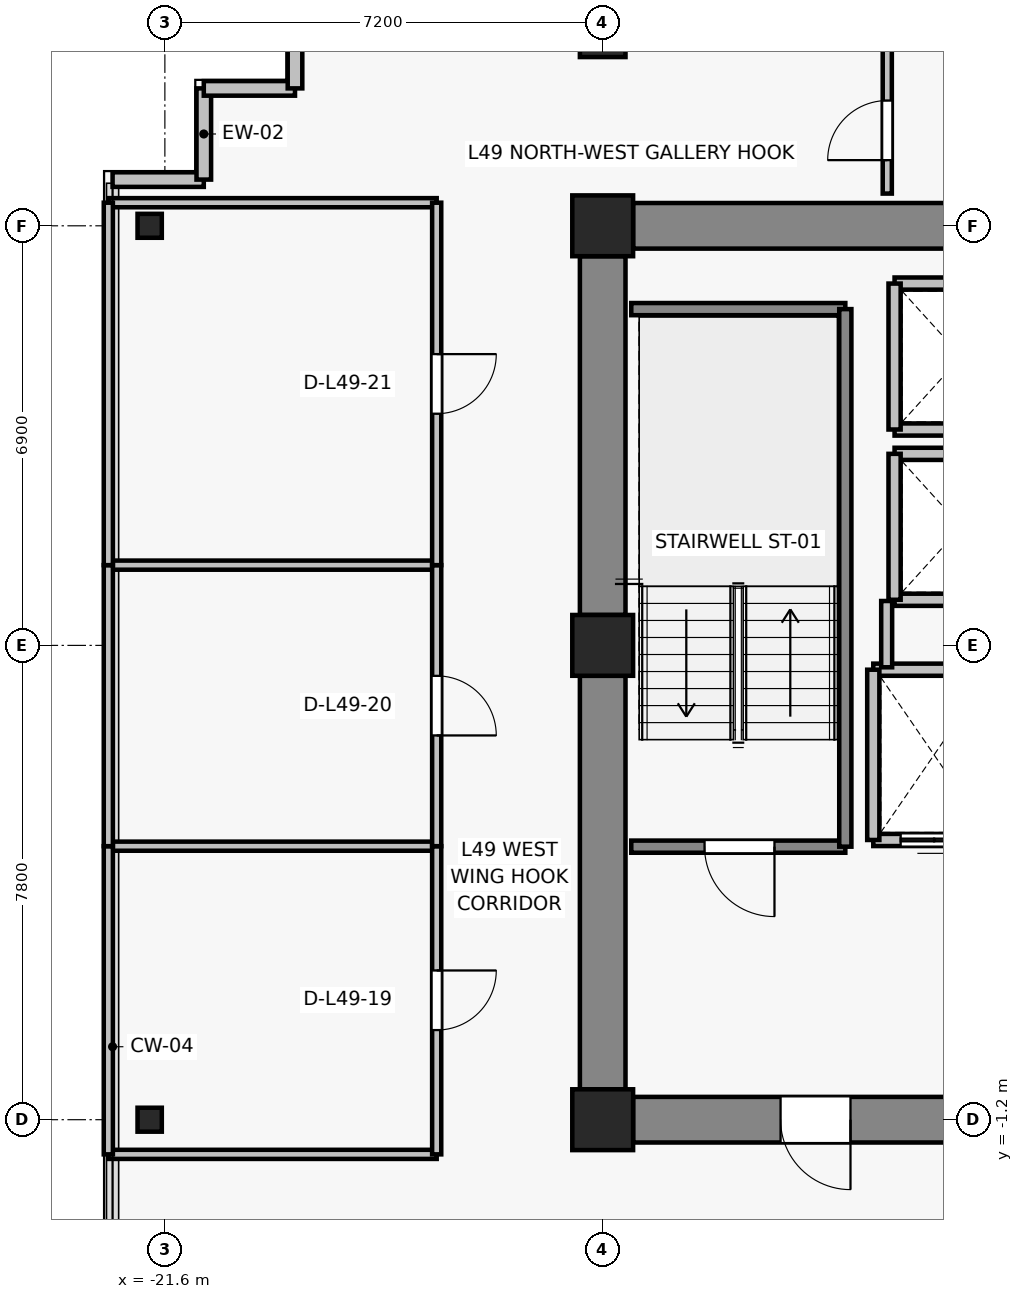
"""IFC4 building model, lengths in metres.
Left out: names, types, materials, properties, quantities, classifications, styles, units other than length and angle.
Written with IfcOpenShell. Run it as: python <this file> out.ifc"""

import sys

from ifc_helpers import new_model, si_unit, direction, frame, frame_2d, origin, origin_2d, place, context, subcontext, project, spatial, rectangle, i_section, extrude, source, transform, mapped, element, fill, save


model = new_model("IFC4")
c1 = context("Model", 3, precision=1e-05, world=origin(), true_north=direction((0.0, 1.0)))
c2 = subcontext(c1, "Body", "Model", "MODEL_VIEW")
j1 = project(units=[si_unit("LENGTHUNIT", "METRE"), si_unit("PLANEANGLEUNIT", "RADIAN")], contexts=[c1])
p1 = place(None, origin())
s1 = spatial("IfcSite", under=j1, at=p1, CompositionType="ELEMENT")
p2 = place(p1, origin())
s2 = spatial("IfcBuilding", under=s1, at=p2, CompositionType="ELEMENT")
p3 = place(p2, frame((0.0, 0.0, 175.9)))
s3 = spatial("IfcBuildingStorey", under=s2, at=p3, CompositionType="ELEMENT", Elevation=175.9)
for number, where, z_axis, x_axis in (
    (1, (-14.4, -1.2, 0.0), (0.0, 0.0, 1.0), (1.0, 0.0, 0.0)),
    (2, (-14.4, 6.6, 0.0), (0.0, 0.0, 1.0), (1.0, 0.0, 0.0)),
    (3, (-14.4, 13.5, 0.0), (0.0, 0.0, 1.0), (1.0, 0.0, 0.0)),
):
    element("IfcColumn", number, at=place(p3, frame(where, z_axis=z_axis, x_axis=x_axis)), inside=s3, PredefinedType="COLUMN", context=c2, shape_type="SweptSolid", body=[
        extrude(rectangle(XDim=1.0, YDim=1.0, at=origin_2d()), origin(), (0.0, 0.0, 1.0), 3.3),
    ])
p4 = place(p3, frame((-14.4, 16.65, 0.0), z_axis=(0.0, 0.0, 1.0), x_axis=(1.0, 0.0, 0.0)))
e4 = element("IfcColumn", 4, at=p4, inside=s3, PredefinedType="COLUMN", context=c2, shape_type="SweptSolid", body=[
    extrude(rectangle(XDim=0.75, YDim=0.75, at=origin_2d()), origin(), (0.0, 0.0, 1.0), 3.3),
])
for number, where, z_axis, x_axis in (
    (5, (-21.85, -1.2, 0.0), (0.0, 0.0, 1.0), (1.0, 0.0, 0.0)),
    (6, (-21.85, 13.5, 0.0), (0.0, 0.0, 1.0), (1.0, 0.0, 0.0)),
):
    element("IfcColumn", number, at=place(p3, frame(where, z_axis=z_axis, x_axis=x_axis)), inside=s3, PredefinedType="COLUMN", context=c2, shape_type="SweptSolid", body=[
        extrude(i_section(OverallWidth=0.399, OverallDepth=0.394, WebThickness=0.023, FlangeThickness=0.037, FilletRadius=0.015, at=origin_2d()), origin(), (0.0, 0.0, 1.0), 3.3),
    ])
p5 = place(p3, frame((-13.9, 13.5, 0.0), z_axis=(0.0, 0.0, 1.0), x_axis=(1.0, 0.0, 0.0)))
e7 = element("IfcWall", 7, at=p5, inside=s3, PredefinedType="SHEAR", context=c2, shape_type="SweptSolid", body=[
    extrude(rectangle(XDim=6.2, YDim=0.75, at=frame_2d((3.1, 0.0))), origin(), (0.0, 0.0, 1.0), 3.075),
])
p6 = place(p3, frame((-14.4, -0.7, 0.0), z_axis=(0.0, 0.0, 1.0), x_axis=(0.0, 1.0, 0.0)))
e8 = element("IfcWall", 8, at=p6, inside=s3, PredefinedType="SHEAR", context=c2, shape_type="SweptSolid", body=[
    extrude(rectangle(XDim=6.8, YDim=0.75, at=frame_2d((3.4, 0.0))), origin(), (0.0, 0.0, 1.0), 3.075),
])
p7 = place(p3, frame((-14.4, 7.1, 0.0), z_axis=(0.0, 0.0, 1.0), x_axis=(0.0, 1.0, 0.0)))
e9 = element("IfcWall", 9, at=p7, inside=s3, PredefinedType="SHEAR", context=c2, shape_type="SweptSolid", body=[
    extrude(rectangle(XDim=5.9, YDim=0.75, at=frame_2d((2.95, 0.0))), origin(), (0.0, 0.0, 1.0), 3.075),
])
p8 = place(p3, frame((-7.7, -1.2, 0.0), z_axis=(0.0, 0.0, 1.0), x_axis=(-1.0, 0.0, 0.0)))
e10 = element("IfcWall", 10, at=p8, inside=s3, PredefinedType="SHEAR", context=c2, shape_type="SweptSolid", body=[
    extrude(rectangle(XDim=6.2, YDim=0.75, at=frame_2d((3.1, 0.0))), origin(), (0.0, 0.0, 1.0), 3.075),
])
p9 = place(p8, frame((2.625, 0.0, 0.0)))
e11 = element("IfcOpeningElement", 11, at=p9, cuts=e10, PredefinedType="OPENING", context=c2, shape_type="SweptSolid", body=[
    extrude(rectangle(XDim=1.15, YDim=2.15, at=frame_2d((0.575, 1.075))), frame((0.0, 0.385, 0.0), z_axis=(0.0, -1.0, 0.0), x_axis=(1.0, 0.0, 0.0)), (0.0, 0.0, 1.0), 0.77),
])
for number, where, z_axis, x_axis in (
    (12, (-20.96, 14.26, 0.0), (0.0, 0.0, 1.0), (-1.0, 0.0, 0.0)),
    (13, (-20.96, 15.76, 0.0), (0.0, 0.0, 1.0), (0.0, -1.0, 0.0)),
    (14, (-19.46, 15.76, 0.0), (0.0, 0.0, 1.0), (-1.0, 0.0, 0.0)),
    (15, (-19.46, 17.26, 0.0), (0.0, 0.0, 1.0), (0.0, -1.0, 0.0)),
):
    element("IfcWall", number, at=place(p3, frame(where, z_axis=z_axis, x_axis=x_axis)), inside=s3, PredefinedType="SOLIDWALL", context=c2, shape_type="SweptSolid", body=[
        extrude(rectangle(XDim=1.5, YDim=0.24, at=frame_2d((0.75, 0.0))), origin(), (0.0, 0.0, 1.0), 3.075),
    ])
p10 = place(p3, frame((-7.95, 3.4, 0.0), z_axis=(0.0, 0.0, 1.0), x_axis=(-1.0, 0.0, 0.0)))
e16 = element("IfcWall", 16, at=p10, inside=s3, PredefinedType="SOLIDWALL", context=c2, shape_type="SweptSolid", body=[
    extrude(rectangle(XDim=2.0, YDim=0.2, at=frame_2d((1.0, 0.0))), origin(), (0.0, 0.0, 1.0), 3.075),
])
p11 = place(p10, frame((0.45, 0.0, 0.0)))
e17 = element("IfcOpeningElement", 17, at=p11, cuts=e16, PredefinedType="OPENING", context=c2, shape_type="SweptSolid", body=[
    extrude(rectangle(XDim=1.1, YDim=2.2, at=frame_2d((0.55, 1.1))), frame((0.0, 0.11, 0.0), z_axis=(0.0, -1.0, 0.0), x_axis=(1.0, 0.0, 0.0)), (0.0, 0.0, 1.0), 0.22),
])
p12 = place(p3, frame((-9.95, 6.2, 0.0), z_axis=(0.0, 0.0, 1.0), x_axis=(1.0, 0.0, 0.0)))
e18 = element("IfcWall", 18, at=p12, inside=s3, PredefinedType="SOLIDWALL", context=c2, shape_type="SweptSolid", body=[
    extrude(rectangle(XDim=2.0, YDim=0.2, at=frame_2d((1.0, 0.0))), origin(), (0.0, 0.0, 1.0), 3.075),
])
p13 = place(p3, frame((-9.95, 3.4, 0.0), z_axis=(0.0, 0.0, 1.0), x_axis=(0.0, 1.0, 0.0)))
e19 = element("IfcWall", 19, at=p13, inside=s3, PredefinedType="SOLIDWALL", context=c2, shape_type="SweptSolid", body=[
    extrude(rectangle(XDim=2.8, YDim=0.2, at=frame_2d((1.4, 0.0))), origin(), (0.0, 0.0, 1.0), 3.075),
])
for number, where, z_axis, x_axis in (
    (20, (-7.4, 7.35, 0.0), (0.0, 0.0, 1.0), (-1.0, 0.0, 0.0)),
    (21, (-9.6, 9.75, 0.0), (0.0, 0.0, 1.0), (1.0, 0.0, 0.0)),
):
    element("IfcWall", number, at=place(p3, frame(where, z_axis=z_axis, x_axis=x_axis)), inside=s3, PredefinedType="SOLIDWALL", context=c2, shape_type="SweptSolid", body=[
        extrude(rectangle(XDim=2.2, YDim=0.2, at=frame_2d((1.1, 0.0))), origin(), (0.0, 0.0, 1.0), 2.565),
    ])
p14 = place(p3, frame((-9.6, 7.35, 0.0), z_axis=(0.0, 0.0, 1.0), x_axis=(0.0, 1.0, 0.0)))
e22 = element("IfcWall", 22, at=p14, inside=s3, PredefinedType="SOLIDWALL", context=c2, shape_type="SweptSolid", body=[
    extrude(rectangle(XDim=2.4, YDim=0.2, at=frame_2d((1.2, 0.0))), origin(), (0.0, 0.0, 1.0), 3.075),
])
for number, where, z_axis, x_axis in (
    (23, (-7.4, 10.15, 0.0), (0.0, 0.0, 1.0), (-1.0, 0.0, 0.0)),
    (24, (-9.6, 12.55, 0.0), (0.0, 0.0, 1.0), (1.0, 0.0, 0.0)),
):
    element("IfcWall", number, at=place(p3, frame(where, z_axis=z_axis, x_axis=x_axis)), inside=s3, PredefinedType="SOLIDWALL", context=c2, shape_type="SweptSolid", body=[
        extrude(rectangle(XDim=2.2, YDim=0.2, at=frame_2d((1.1, 0.0))), origin(), (0.0, 0.0, 1.0), 2.565),
    ])
p15 = place(p3, frame((-9.6, 10.15, 0.0), z_axis=(0.0, 0.0, 1.0), x_axis=(0.0, 1.0, 0.0)))
e25 = element("IfcWall", 25, at=p15, inside=s3, PredefinedType="SOLIDWALL", context=c2, shape_type="SweptSolid", body=[
    extrude(rectangle(XDim=2.4, YDim=0.2, at=frame_2d((1.2, 0.0))), origin(), (0.0, 0.0, 1.0), 3.075),
])
p16 = place(p3, frame((-10.41, 3.29, 0.0), z_axis=(0.0, 0.0, 1.0), x_axis=(-1.0, 0.0, 0.0)))
e26 = element("IfcWall", 26, at=p16, inside=s3, PredefinedType="SOLIDWALL", context=c2, shape_type="SweptSolid", body=[
    extrude(rectangle(XDim=3.52, YDim=0.2, at=frame_2d((1.76, 0.0))), origin(), (0.0, 0.0, 1.0), 3.075),
])
p17 = place(p16, frame((1.165, 0.0, 0.0)))
e27 = element("IfcOpeningElement", 27, at=p17, cuts=e26, PredefinedType="OPENING", context=c2, shape_type="SweptSolid", body=[
    extrude(rectangle(XDim=1.15, YDim=2.15, at=frame_2d((0.575, 1.075))), frame((0.0, 0.11, 0.0), z_axis=(0.0, -1.0, 0.0), x_axis=(1.0, 0.0, 0.0)), (0.0, 0.0, 1.0), 0.22),
])
p18 = place(p3, frame((-13.93, 12.13, 0.0), z_axis=(0.0, 0.0, 1.0), x_axis=(1.0, 0.0, 0.0)))
e28 = element("IfcWall", 28, at=p18, inside=s3, PredefinedType="SOLIDWALL", context=c2, shape_type="SweptSolid", body=[
    extrude(rectangle(XDim=3.52, YDim=0.2, at=frame_2d((1.76, 0.0))), origin(), (0.0, 0.0, 1.0), 3.075),
])
p19 = place(p3, frame((-10.41, 12.13, 0.0), z_axis=(0.0, 0.0, 1.0), x_axis=(0.0, -1.0, 0.0)))
e29 = element("IfcWall", 29, at=p19, inside=s3, PredefinedType="SOLIDWALL", context=c2, shape_type="SweptSolid", body=[
    extrude(rectangle(XDim=8.84, YDim=0.2, at=frame_2d((4.42, 0.0))), origin(), (0.0, 0.0, 1.0), 3.075),
])
p20 = place(p3, frame((-9.73, 6.24, 0.0), z_axis=(0.0, 0.0, 1.0), x_axis=(0.0, 1.0, 0.0)))
e30 = element("IfcWall", 30, at=p20, inside=s3, PredefinedType="PARTITIONING", context=c2, shape_type="SweptSolid", body=[
    extrude(rectangle(XDim=1.09, YDim=0.18, at=frame_2d((0.545, 0.0))), origin(), (0.0, 0.0, 1.0), 3.075),
])
for number, where, z_axis, x_axis in (
    (31, (-17.13, -1.77, 0.0), (0.0, 0.0, 1.0), (-1.0, 0.0, 0.0)),
    (32, (-22.53, 3.298, 0.0), (0.0, 0.0, 1.0), (1.0, 0.0, 0.0)),
):
    element("IfcWall", number, at=place(p3, frame(where, z_axis=z_axis, x_axis=x_axis)), inside=s3, PredefinedType="PARTITIONING", context=c2, shape_type="SweptSolid", body=[
        extrude(rectangle(XDim=5.4, YDim=0.15, at=frame_2d((2.7, 0.0))), origin(), (0.0, 0.0, 1.0), 2.565),
    ])
p21 = place(p3, frame((-22.53, -1.77, 0.0), z_axis=(0.0, 0.0, 1.0), x_axis=(0.0, 1.0, 0.0)))
e33 = element("IfcWall", 33, at=p21, inside=s3, PredefinedType="PARTITIONING", context=c2, shape_type="SweptSolid", body=[
    extrude(rectangle(XDim=5.068, YDim=0.15, at=frame_2d((2.534, 0.0))), origin(), (0.0, 0.0, 1.0), 3.075),
])
p22 = place(p3, frame((-17.13, 3.298, 0.0), z_axis=(0.0, 0.0, 1.0), x_axis=(0.0, -1.0, 0.0)))
e34 = element("IfcWall", 34, at=p22, inside=s3, PredefinedType="PARTITIONING", context=c2, shape_type="SweptSolid", body=[
    extrude(rectangle(XDim=5.068, YDim=0.15, at=frame_2d((2.534, 0.0))), origin(), (0.0, 0.0, 1.0), 2.565),
])
p23 = place(p22, frame((2.044, 0.0, 0.0)))
e35 = element("IfcOpeningElement", 35, at=p23, cuts=e34, PredefinedType="OPENING", context=c2, shape_type="SweptSolid", body=[
    extrude(rectangle(XDim=0.98, YDim=2.15, at=frame_2d((0.49, 1.075))), frame((0.0, 0.085, 0.0), z_axis=(0.0, -1.0, 0.0), x_axis=(1.0, 0.0, 0.0)), (0.0, 0.0, 1.0), 0.17),
])
p24 = place(p3, frame((-22.53, 7.92, 0.0), z_axis=(0.0, 0.0, 1.0), x_axis=(1.0, 0.0, 0.0)))
e36 = element("IfcWall", 36, at=p24, inside=s3, PredefinedType="PARTITIONING", context=c2, shape_type="SweptSolid", body=[
    extrude(rectangle(XDim=5.4, YDim=0.15, at=frame_2d((2.7, 0.0))), origin(), (0.0, 0.0, 1.0), 2.565),
])
p25 = place(p3, frame((-22.53, 3.298, 0.0), z_axis=(0.0, 0.0, 1.0), x_axis=(0.0, 1.0, 0.0)))
e37 = element("IfcWall", 37, at=p25, inside=s3, PredefinedType="PARTITIONING", context=c2, shape_type="SweptSolid", body=[
    extrude(rectangle(XDim=4.622, YDim=0.15, at=frame_2d((2.311, 0.0))), origin(), (0.0, 0.0, 1.0), 3.075),
])
p26 = place(p3, frame((-17.13, 7.92, 0.0), z_axis=(0.0, 0.0, 1.0), x_axis=(0.0, -1.0, 0.0)))
e38 = element("IfcWall", 38, at=p26, inside=s3, PredefinedType="PARTITIONING", context=c2, shape_type="SweptSolid", body=[
    extrude(rectangle(XDim=4.622, YDim=0.15, at=frame_2d((2.311, 0.0))), origin(), (0.0, 0.0, 1.0), 3.075),
])
p27 = place(p26, frame((1.821, 0.0, 0.0)))
e39 = element("IfcOpeningElement", 39, at=p27, cuts=e38, PredefinedType="OPENING", context=c2, shape_type="SweptSolid", body=[
    extrude(rectangle(XDim=0.98, YDim=2.15, at=frame_2d((0.49, 1.075))), frame((0.0, 0.085, 0.0), z_axis=(0.0, -1.0, 0.0), x_axis=(1.0, 0.0, 0.0)), (0.0, 0.0, 1.0), 0.17),
])
p28 = place(p3, frame((-22.53, 13.88, 0.0), z_axis=(0.0, 0.0, 1.0), x_axis=(1.0, 0.0, 0.0)))
e40 = element("IfcWall", 40, at=p28, inside=s3, PredefinedType="PARTITIONING", context=c2, shape_type="SweptSolid", body=[
    extrude(rectangle(XDim=5.4, YDim=0.15, at=frame_2d((2.7, 0.0))), origin(), (0.0, 0.0, 1.0), 3.075),
])
p29 = place(p3, frame((-22.53, 7.92, 0.0), z_axis=(0.0, 0.0, 1.0), x_axis=(0.0, 1.0, 0.0)))
e41 = element("IfcWall", 41, at=p29, inside=s3, PredefinedType="PARTITIONING", context=c2, shape_type="SweptSolid", body=[
    extrude(rectangle(XDim=5.96, YDim=0.15, at=frame_2d((2.98, 0.0))), origin(), (0.0, 0.0, 1.0), 3.075),
])
p30 = place(p3, frame((-17.13, 13.88, 0.0), z_axis=(0.0, 0.0, 1.0), x_axis=(0.0, -1.0, 0.0)))
e42 = element("IfcWall", 42, at=p30, inside=s3, PredefinedType="PARTITIONING", context=c2, shape_type="SweptSolid", body=[
    extrude(rectangle(XDim=5.96, YDim=0.15, at=frame_2d((2.98, 0.0))), origin(), (0.0, 0.0, 1.0), 2.565),
])
p31 = place(p30, frame((2.49, 0.0, 0.0)))
e43 = element("IfcOpeningElement", 43, at=p31, cuts=e42, PredefinedType="OPENING", context=c2, shape_type="SweptSolid", body=[
    extrude(rectangle(XDim=0.98, YDim=2.15, at=frame_2d((0.49, 1.075))), frame((0.0, 0.085, 0.0), z_axis=(0.0, -1.0, 0.0), x_axis=(1.0, 0.0, 0.0)), (0.0, 0.0, 1.0), 0.17),
])
p32 = place(p3, frame((-9.72, 14.03, 0.0), z_axis=(0.0, 0.0, 1.0), x_axis=(0.0, 1.0, 0.0)))
e44 = element("IfcWall", 44, at=p32, inside=s3, PredefinedType="PARTITIONING", context=c2, shape_type="SweptSolid", body=[
    extrude(rectangle(XDim=3.3, YDim=0.15, at=frame_2d((1.65, 0.0))), origin(), (0.0, 0.0, 1.0), 2.565),
])
p33 = place(p32, frame((0.55, 0.0, 0.0)))
e45 = element("IfcOpeningElement", 45, at=p33, cuts=e44, PredefinedType="OPENING", context=c2, shape_type="SweptSolid", body=[
    extrude(rectangle(XDim=0.98, YDim=2.15, at=frame_2d((0.49, 1.075))), frame((0.0, 0.085, 0.0), z_axis=(0.0, -1.0, 0.0), x_axis=(1.0, 0.0, 0.0)), (0.0, 0.0, 1.0), 0.17),
])
m1 = source(origin(), c2, "Body", "SweptSolid", [
    extrude(rectangle(XDim=1.1, YDim=2.2, at=frame_2d((0.55, 1.1))), frame((0.0, 0.025, 0.0), z_axis=(0.0, -1.0, 0.0), x_axis=(1.0, 0.0, 0.0)), (0.0, 0.0, 1.0), 0.05),
])
p34 = place(p11, origin())
e46 = element("IfcDoor", 46, at=p34, inside=s3, OperationType="DOUBLE_DOOR_SLIDING", PredefinedType="DOOR", context=c2, shape_type="MappedRepresentation", body=[
    mapped(m1, transform((0.0, 0.0, 0.0), x_axis=(1.0, 0.0, 0.0), y_axis=(0.0, 1.0, 0.0), z_axis=(0.0, 0.0, 1.0), scale=1.0)),
])
fill(e17, e46)
m2 = source(origin(), c2, "Body", "SweptSolid", [
    extrude(rectangle(XDim=1.15, YDim=2.15, at=frame_2d((0.575, 1.075))), frame((0.0, 0.025, 0.0), z_axis=(0.0, -1.0, 0.0), x_axis=(1.0, 0.0, 0.0)), (0.0, 0.0, 1.0), 0.05),
])
p35 = place(p17, origin())
e47 = element("IfcDoor", 47, at=p35, inside=s3, OperationType="SINGLE_SWING_LEFT", PredefinedType="DOOR", context=c2, shape_type="MappedRepresentation", body=[
    mapped(m2, transform((0.0, 0.0, 0.0), x_axis=(1.0, 0.0, 0.0), y_axis=(0.0, 1.0, 0.0), z_axis=(0.0, 0.0, 1.0), scale=1.0)),
])
fill(e27, e47)
p36 = place(p9, origin())
e48 = element("IfcDoor", 48, at=p36, inside=s3, OperationType="SINGLE_SWING_LEFT", PredefinedType="DOOR", context=c2, shape_type="MappedRepresentation", body=[
    mapped(m2, transform((0.0, 0.0, 0.0), x_axis=(1.0, 0.0, 0.0), y_axis=(0.0, 1.0, 0.0), z_axis=(0.0, 0.0, 1.0), scale=1.0)),
])
fill(e11, e48)
m3 = source(origin(), c2, "Body", "SweptSolid", [
    extrude(rectangle(XDim=0.98, YDim=2.15, at=frame_2d((0.49, 1.075))), frame((0.0, 0.025, 0.0), z_axis=(0.0, -1.0, 0.0), x_axis=(1.0, 0.0, 0.0)), (0.0, 0.0, 1.0), 0.05),
])
p37 = place(p23, origin())
e49 = element("IfcDoor", 49, at=p37, inside=s3, OperationType="SINGLE_SWING_LEFT", PredefinedType="DOOR", context=c2, shape_type="MappedRepresentation", body=[
    mapped(m3, transform((0.0, 0.0, 0.0), x_axis=(1.0, 0.0, 0.0), y_axis=(0.0, 1.0, 0.0), z_axis=(0.0, 0.0, 1.0), scale=1.0)),
])
fill(e35, e49)
p38 = place(p27, origin())
e50 = element("IfcDoor", 50, at=p38, inside=s3, OperationType="SINGLE_SWING_RIGHT", PredefinedType="DOOR", context=c2, shape_type="MappedRepresentation", body=[
    mapped(m3, transform((0.0, 0.0, 0.0), x_axis=(1.0, 0.0, 0.0), y_axis=(0.0, 1.0, 0.0), z_axis=(0.0, 0.0, 1.0), scale=1.0)),
])
fill(e39, e50)
p39 = place(p31, origin())
e51 = element("IfcDoor", 51, at=p39, inside=s3, OperationType="SINGLE_SWING_LEFT", PredefinedType="DOOR", context=c2, shape_type="MappedRepresentation", body=[
    mapped(m3, transform((0.0, 0.0, 0.0), x_axis=(1.0, 0.0, 0.0), y_axis=(0.0, 1.0, 0.0), z_axis=(0.0, 0.0, 1.0), scale=1.0)),
])
fill(e43, e51)
p40 = place(p33, origin())
e52 = element("IfcDoor", 52, at=p40, inside=s3, OperationType="SINGLE_SWING_LEFT", PredefinedType="DOOR", context=c2, shape_type="MappedRepresentation", body=[
    mapped(m3, transform((0.0, 0.0, 0.0), x_axis=(1.0, 0.0, 0.0), y_axis=(0.0, 1.0, 0.0), z_axis=(0.0, 0.0, 1.0), scale=1.0)),
])
fill(e45, e52)
save(model, sys.argv[1])
